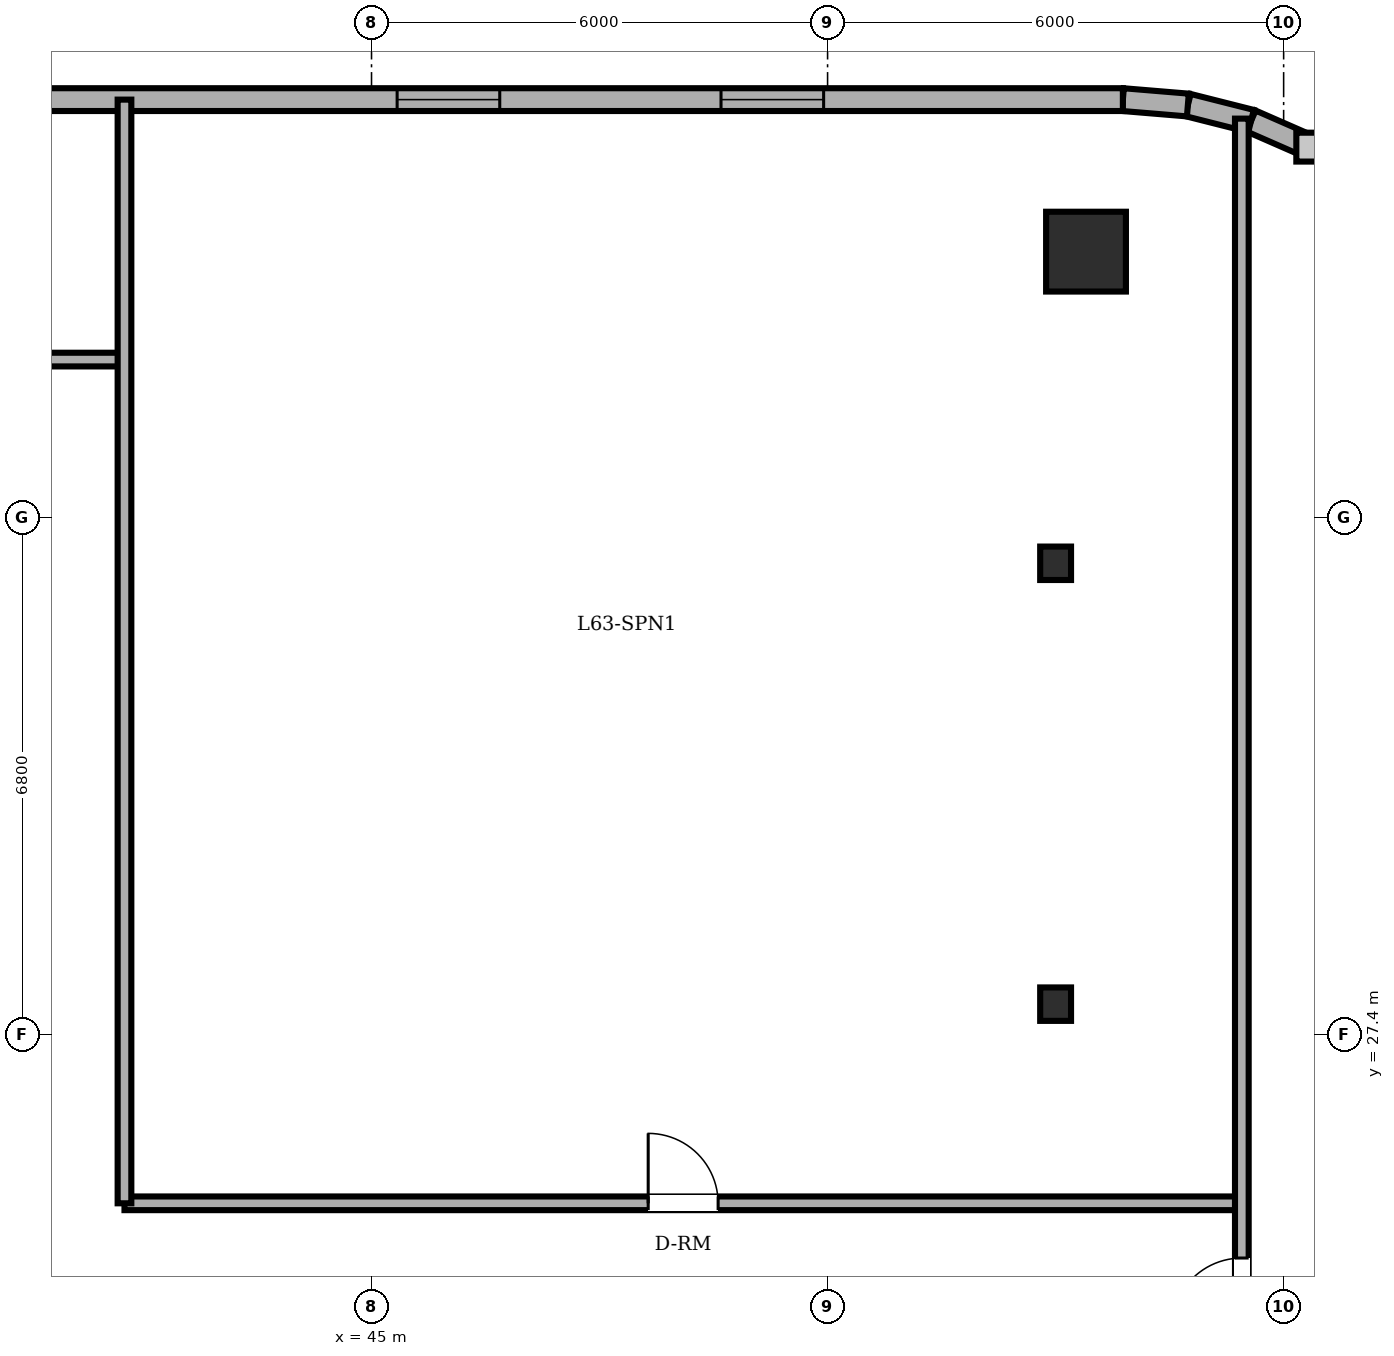
"""IFC4 building model, lengths in metres.
Left out: names, types, materials, properties, quantities, classifications, styles, units other than length and angle.
Written with IfcOpenShell. Run it as: python <this file> out.ifc"""

import sys

from ifc_helpers import new_model, si_unit, direction, frame, frame_2d, origin, origin_2d, place, context, subcontext, project, spatial, rectangle, circle, i_section, extrude, element, fill, save


model = new_model("IFC4")
c1 = context("Model", 3, precision=1e-05, world=origin(), true_north=direction((0.0, 1.0)))
c2 = subcontext(c1, "Body", "Model", "MODEL_VIEW")
j1 = project(units=[si_unit("LENGTHUNIT", "METRE"), si_unit("PLANEANGLEUNIT", "RADIAN")], contexts=[c1])
p1 = place(None, origin())
s1 = spatial("IfcSite", under=j1, at=p1, CompositionType="ELEMENT")
p2 = place(p1, origin())
s2 = spatial("IfcBuilding", under=s1, at=p2, CompositionType="ELEMENT")
p3 = place(p2, frame((0.0, 0.0, 240.9)))
s3 = spatial("IfcBuildingStorey", under=s2, at=p3, CompositionType="ELEMENT", Elevation=240.9)
p4 = place(p3, frame((54.4, 37.7, 0.0), z_axis=(0.0, 0.0, 1.0), x_axis=(1.0, 0.0, 0.0)))
e1 = element("IfcColumn", 1, at=p4, inside=s3, PredefinedType="COLUMN", context=c2, shape_type="SweptSolid", body=[
    extrude(circle(Radius=0.525, at=origin_2d()), origin(), (0.0, 0.0, 1.0), 3.6),
])
for number, where, z_axis, x_axis in (
    (2, (54.0, 27.8, 0.0), (0.0, 0.0, 1.0), (1.0, 0.0, 0.0)),
    (3, (54.0, 33.6, 0.0), (0.0, 0.0, 1.0), (1.0, 0.0, 0.0)),
):
    element("IfcColumn", number, at=place(p3, frame(where, z_axis=z_axis, x_axis=x_axis)), inside=s3, PredefinedType="COLUMN", context=c2, shape_type="SweptSolid", body=[
        extrude(i_section(OverallWidth=0.406, OverallDepth=0.44, WebThickness=0.024, FlangeThickness=0.039, FilletRadius=0.015, at=origin_2d()), origin(), (0.0, 0.0, 1.0), 3.6),
    ])
p5 = place(p3, frame((57.357, 39.075, 0.0), z_axis=(0.0, 0.0, 1.0), x_axis=(-0.916085473636, 0.400983048261, 0.0)))
e4 = element("IfcWall", 4, at=p5, inside=s3, PredefinedType="SOLIDWALL", context=c2, shape_type="SweptSolid", body=[
    extrude(rectangle(XDim=0.858, YDim=0.3, at=frame_2d((0.429, 0.0))), origin(), (0.0, 0.0, 1.0), 3.4),
])
p6 = place(p3, frame((56.571, 39.419, 0.0), z_axis=(0.0, 0.0, 1.0), x_axis=(-0.969536346338, 0.244947490555, 0.0)))
e5 = element("IfcWall", 5, at=p6, inside=s3, PredefinedType="SOLIDWALL", context=c2, shape_type="SweptSolid", body=[
    extrude(rectangle(XDim=0.857, YDim=0.3, at=frame_2d((0.429, 0.0))), origin(), (0.0, 0.0, 1.0), 3.4),
])
p7 = place(p3, frame((55.74, 39.629, 0.0), z_axis=(0.0, 0.0, 1.0), x_axis=(-0.996565355958, 0.082809971041, 0.0)))
e6 = element("IfcWall", 6, at=p7, inside=s3, PredefinedType="SOLIDWALL", context=c2, shape_type="SweptSolid", body=[
    extrude(rectangle(XDim=0.858, YDim=0.3, at=frame_2d((0.429, 0.0))), origin(), (0.0, 0.0, 1.0), 3.4),
])
p8 = place(p3, frame((54.885, 39.7, 0.0), z_axis=(0.0, 0.0, 1.0), x_axis=(-1.0, 0.0, 0.0)))
e7 = element("IfcWall", 7, at=p8, inside=s3, PredefinedType="SOLIDWALL", context=c2, shape_type="SweptSolid", body=[
    extrude(rectangle(XDim=32.485, YDim=0.3, at=frame_2d((16.243, 0.0))), origin(), (0.0, 0.0, 1.0), 3.4),
])
p9 = place(p8, frame((18.01, 0.0, 0.0)))
e8 = element("IfcOpeningElement", 8, at=p9, cuts=e7, PredefinedType="OPENING", context=c2, shape_type="SweptSolid", body=[
    extrude(rectangle(XDim=0.95, YDim=2.2, at=frame_2d((0.475, 1.1))), frame((0.0, 0.16, 0.0), z_axis=(0.0, -1.0, 0.0), x_axis=(1.0, 0.0, 0.0)), (0.0, 0.0, 1.0), 0.32),
])
p10 = place(p8, frame((3.937, 0.0, 0.85)))
e9 = element("IfcOpeningElement", 9, at=p10, cuts=e7, PredefinedType="OPENING", context=c2, shape_type="SweptSolid", body=[
    extrude(rectangle(XDim=1.35, YDim=1.55, at=frame_2d((0.675, 0.775))), frame((0.0, 0.16, 0.0), z_axis=(0.0, -1.0, 0.0), x_axis=(1.0, 0.0, 0.0)), (0.0, 0.0, 1.0), 0.32),
])
p11 = place(p8, frame((8.198, 0.0, 0.85)))
e10 = element("IfcOpeningElement", 10, at=p11, cuts=e7, PredefinedType="OPENING", context=c2, shape_type="SweptSolid", body=[
    extrude(rectangle(XDim=1.35, YDim=1.55, at=frame_2d((0.675, 0.775))), frame((0.0, 0.16, 0.0), z_axis=(0.0, -1.0, 0.0), x_axis=(1.0, 0.0, 0.0)), (0.0, 0.0, 1.0), 0.32),
])
p12 = place(p8, frame((15.31, 0.0, 0.85)))
e11 = element("IfcOpeningElement", 11, at=p12, cuts=e7, PredefinedType="OPENING", context=c2, shape_type="SweptSolid", body=[
    extrude(rectangle(XDim=1.35, YDim=1.55, at=frame_2d((0.675, 0.775))), frame((0.0, 0.16, 0.0), z_axis=(0.0, -1.0, 0.0), x_axis=(1.0, 0.0, 0.0)), (0.0, 0.0, 1.0), 0.32),
])
p13 = place(p8, frame((22.91, 0.0, 0.85)))
e12 = element("IfcOpeningElement", 12, at=p13, cuts=e7, PredefinedType="OPENING", context=c2, shape_type="SweptSolid", body=[
    extrude(rectangle(XDim=1.35, YDim=1.55, at=frame_2d((0.675, 0.775))), frame((0.0, 0.16, 0.0), z_axis=(0.0, -1.0, 0.0), x_axis=(1.0, 0.0, 0.0)), (0.0, 0.0, 1.0), 0.32),
])
p14 = place(p8, frame((26.51, 0.0, 0.85)))
e13 = element("IfcOpeningElement", 13, at=p14, cuts=e7, PredefinedType="OPENING", context=c2, shape_type="SweptSolid", body=[
    extrude(rectangle(XDim=1.35, YDim=1.55, at=frame_2d((0.675, 0.775))), frame((0.0, 0.16, 0.0), z_axis=(0.0, -1.0, 0.0), x_axis=(1.0, 0.0, 0.0)), (0.0, 0.0, 1.0), 0.32),
])
p15 = place(p8, frame((29.835, 0.0, 0.85)))
e14 = element("IfcOpeningElement", 14, at=p15, cuts=e7, PredefinedType="OPENING", context=c2, shape_type="SweptSolid", body=[
    extrude(rectangle(XDim=1.35, YDim=1.55, at=frame_2d((0.675, 0.775))), frame((0.0, 0.16, 0.0), z_axis=(0.0, -1.0, 0.0), x_axis=(1.0, 0.0, 0.0)), (0.0, 0.0, 1.0), 0.32),
])
p16 = place(p3, frame((41.75, 25.18, 0.0), z_axis=(0.0, 0.0, 1.0), x_axis=(1.0, 0.0, 0.0)))
e15 = element("IfcWall", 15, at=p16, inside=s3, PredefinedType="PARTITIONING", context=c2, shape_type="SweptSolid", body=[
    extrude(rectangle(XDim=14.7, YDim=0.18, at=frame_2d((7.35, 0.0))), origin(), (0.0, 0.0, 1.0), 3.4),
])
p17 = place(p16, frame((6.89, 0.0, 0.0)))
e16 = element("IfcOpeningElement", 16, at=p17, cuts=e15, PredefinedType="OPENING", context=c2, shape_type="SweptSolid", body=[
    extrude(rectangle(XDim=0.92, YDim=2.1, at=frame_2d((0.46, 1.05))), frame((0.0, 0.1, 0.0), z_axis=(0.0, -1.0, 0.0), x_axis=(1.0, 0.0, 0.0)), (0.0, 0.0, 1.0), 0.2),
])
p18 = place(p3, frame((17.677, 36.28, 0.0), z_axis=(0.0, 0.0, 1.0), x_axis=(1.0, 0.0, 0.0)))
e17 = element("IfcWall", 17, at=p18, inside=s3, PredefinedType="PARTITIONING", context=c2, shape_type="SweptSolid", body=[
    extrude(rectangle(XDim=24.073, YDim=0.18, at=frame_2d((12.037, 0.0))), origin(), (0.0, 0.0, 1.0), 3.4),
])
p19 = place(p18, frame((9.573, 0.0, 0.0)))
e18 = element("IfcOpeningElement", 18, at=p19, cuts=e17, PredefinedType="OPENING", context=c2, shape_type="SweptSolid", body=[
    extrude(rectangle(XDim=0.9, YDim=2.1, at=frame_2d((0.45, 1.05))), frame((0.0, 0.1, 0.0), z_axis=(0.0, -1.0, 0.0), x_axis=(1.0, 0.0, 0.0)), (0.0, 0.0, 1.0), 0.2),
])
p20 = place(p18, frame((13.193, 0.0, 0.0)))
e19 = element("IfcOpeningElement", 19, at=p20, cuts=e17, PredefinedType="OPENING", context=c2, shape_type="SweptSolid", body=[
    extrude(rectangle(XDim=0.86, YDim=2.1, at=frame_2d((0.43, 1.05))), frame((0.0, 0.1, 0.0), z_axis=(0.0, -1.0, 0.0), x_axis=(1.0, 0.0, 0.0)), (0.0, 0.0, 1.0), 0.2),
])
p21 = place(p18, frame((4.063, 0.0, 0.0)))
e20 = element("IfcOpeningElement", 20, at=p21, cuts=e17, PredefinedType="OPENING", context=c2, shape_type="SweptSolid", body=[
    extrude(rectangle(XDim=0.92, YDim=2.1, at=frame_2d((0.46, 1.05))), frame((0.0, 0.1, 0.0), z_axis=(0.0, -1.0, 0.0), x_axis=(1.0, 0.0, 0.0)), (0.0, 0.0, 1.0), 0.2),
])
p22 = place(p18, frame((19.038, 0.0, 0.0)))
e21 = element("IfcOpeningElement", 21, at=p22, cuts=e17, PredefinedType="OPENING", context=c2, shape_type="SweptSolid", body=[
    extrude(rectangle(XDim=1.0, YDim=2.15, at=frame_2d((0.5, 1.075))), frame((0.0, 0.1, 0.0), z_axis=(0.0, -1.0, 0.0), x_axis=(1.0, 0.0, 0.0)), (0.0, 0.0, 1.0), 0.2),
])
p23 = place(p3, frame((41.75, 25.18, 0.0), z_axis=(0.0, 0.0, 1.0), x_axis=(0.0, 1.0, 0.0)))
e22 = element("IfcWall", 22, at=p23, inside=s3, PredefinedType="PARTITIONING", context=c2, shape_type="SweptSolid", body=[
    extrude(rectangle(XDim=14.52, YDim=0.18, at=frame_2d((7.26, 0.0))), origin(), (0.0, 0.0, 1.0), 3.4),
])
p24 = place(p3, frame((56.45, 8.55, 0.0), z_axis=(0.0, 0.0, 1.0), x_axis=(0.0, 1.0, 0.0)))
e23 = element("IfcWall", 23, at=p24, inside=s3, PredefinedType="PARTITIONING", context=c2, shape_type="SweptSolid", body=[
    extrude(rectangle(XDim=30.9, YDim=0.18, at=frame_2d((15.45, 0.0))), origin(), (0.0, 0.0, 1.0), 3.4),
])
p25 = place(p24, frame((14.99, 0.0, 0.0)))
e24 = element("IfcOpeningElement", 24, at=p25, cuts=e23, PredefinedType="OPENING", context=c2, shape_type="SweptSolid", body=[
    extrude(rectangle(XDim=0.92, YDim=2.1, at=frame_2d((0.46, 1.05))), frame((0.0, 0.1, 0.0), z_axis=(0.0, -1.0, 0.0), x_axis=(1.0, 0.0, 0.0)), (0.0, 0.0, 1.0), 0.2),
])
p26 = place(p10, origin())
e25 = element("IfcWindow", 25, at=p26, inside=s3, PartitioningType="SINGLE_PANEL", PredefinedType="WINDOW", context=c2, shape_type="SweptSolid", body=[
    extrude(rectangle(XDim=1.35, YDim=1.55, at=frame_2d((0.675, 0.775))), frame((0.0, 0.03, 0.0), z_axis=(0.0, -1.0, 0.0), x_axis=(1.0, 0.0, 0.0)), (0.0, 0.0, 1.0), 0.06),
])
fill(e9, e25)
p27 = place(p11, origin())
e26 = element("IfcWindow", 26, at=p27, inside=s3, PartitioningType="SINGLE_PANEL", PredefinedType="WINDOW", context=c2, shape_type="SweptSolid", body=[
    extrude(rectangle(XDim=1.35, YDim=1.55, at=frame_2d((0.675, 0.775))), frame((0.0, 0.03, 0.0), z_axis=(0.0, -1.0, 0.0), x_axis=(1.0, 0.0, 0.0)), (0.0, 0.0, 1.0), 0.06),
])
fill(e10, e26)
p28 = place(p17, origin())
e27 = element("IfcDoor", 27, at=p28, inside=s3, OperationType="SINGLE_SWING_LEFT", PredefinedType="DOOR", context=c2, shape_type="SweptSolid", body=[
    extrude(rectangle(XDim=0.92, YDim=2.1, at=frame_2d((0.46, 1.05))), frame((0.0, 0.025, 0.0), z_axis=(0.0, -1.0, 0.0), x_axis=(1.0, 0.0, 0.0)), (0.0, 0.0, 1.0), 0.05),
])
fill(e16, e27)
p29 = place(p25, origin())
e28 = element("IfcDoor", 28, at=p29, inside=s3, OperationType="SINGLE_SWING_LEFT", PredefinedType="DOOR", context=c2, shape_type="SweptSolid", body=[
    extrude(rectangle(XDim=0.92, YDim=2.1, at=frame_2d((0.46, 1.05))), frame((0.0, 0.025, 0.0), z_axis=(0.0, -1.0, 0.0), x_axis=(1.0, 0.0, 0.0)), (0.0, 0.0, 1.0), 0.05),
])
fill(e24, e28)
save(model, sys.argv[1])
